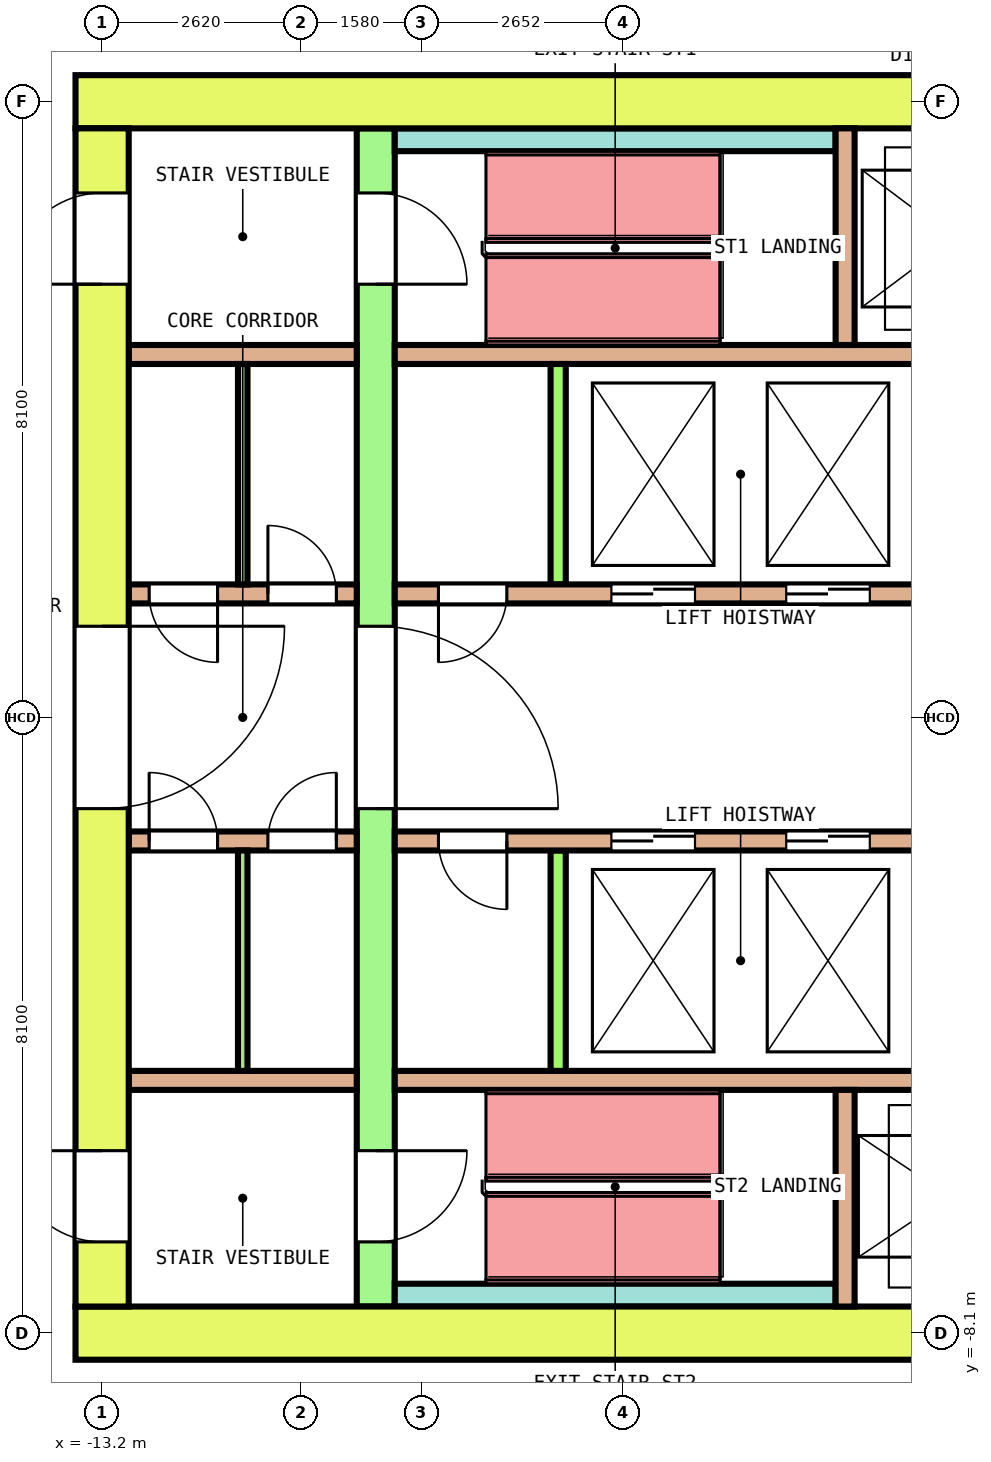
"""IFC4 building model, lengths in metres.
Left out: names, types, materials, properties, quantities, classifications, styles, units other than length and angle.
Written with IfcOpenShell. Run it as: python <this file> out.ifc"""

import sys

from ifc_helpers import new_model, si_unit, direction, frame, frame_2d, origin, place, context, subcontext, project, spatial, rectangle, extrude, element, fill, save


model = new_model("IFC4")
c1 = context("Model", 3, precision=1e-05, world=origin(), true_north=direction((0.0, 1.0)))
c2 = subcontext(c1, "Body", "Model", "MODEL_VIEW")
j1 = project(units=[si_unit("LENGTHUNIT", "METRE"), si_unit("PLANEANGLEUNIT", "RADIAN")], contexts=[c1])
p1 = place(None, origin())
s1 = spatial("IfcSite", under=j1, at=p1, CompositionType="ELEMENT")
p2 = place(p1, origin())
s2 = spatial("IfcBuilding", under=s1, at=p2, CompositionType="ELEMENT")
p3 = place(p2, frame((0.0, 0.0, 193.6)))
s3 = spatial("IfcBuildingStorey", under=s2, at=p3, CompositionType="ELEMENT", Elevation=193.6)
p4 = place(p3, frame((-13.55, 8.1, 0.0), z_axis=(0.0, 0.0, 1.0), x_axis=(1.0, 0.0, 0.0)))
e1 = element("IfcWall", 1, at=p4, inside=s3, PredefinedType="SHEAR", context=c2, shape_type="SweptSolid", body=[
    extrude(rectangle(XDim=27.1, YDim=0.7, at=frame_2d((13.55, 0.0))), origin(), (0.0, 0.0, 1.0), 4.1),
])
p5 = place(p4, frame((14.475, 0.0, 0.0)))
e2 = element("IfcOpeningElement", 2, at=p5, cuts=e1, PredefinedType="OPENING", context=c2, shape_type="SweptSolid", body=[
    extrude(rectangle(XDim=1.4, YDim=2.1, at=frame_2d((0.7, 1.05))), frame((0.0, 0.36, 0.0), z_axis=(0.0, -1.0, 0.0), x_axis=(1.0, 0.0, 0.0)), (0.0, 0.0, 1.0), 0.72),
])
p6 = place(p3, frame((-13.55, -8.1, 0.0), z_axis=(0.0, 0.0, 1.0), x_axis=(1.0, 0.0, 0.0)))
e3 = element("IfcWall", 3, at=p6, inside=s3, PredefinedType="SHEAR", context=c2, shape_type="SweptSolid", body=[
    extrude(rectangle(XDim=27.1, YDim=0.7, at=frame_2d((13.55, 0.0))), origin(), (0.0, 0.0, 1.0), 4.1),
])
p7 = place(p6, frame((15.1, 0.0, 0.0)))
e4 = element("IfcOpeningElement", 4, at=p7, cuts=e3, PredefinedType="OPENING", context=c2, shape_type="SweptSolid", body=[
    extrude(rectangle(XDim=1.2, YDim=2.1, at=frame_2d((0.6, 1.05))), frame((0.0, 0.36, 0.0), z_axis=(0.0, -1.0, 0.0), x_axis=(1.0, 0.0, 0.0)), (0.0, 0.0, 1.0), 0.72),
])
p8 = place(p3, frame((-13.2, -7.75, 0.0), z_axis=(0.0, 0.0, 1.0), x_axis=(0.0, 1.0, 0.0)))
e5 = element("IfcWall", 5, at=p8, inside=s3, PredefinedType="SHEAR", context=c2, shape_type="SweptSolid", body=[
    extrude(rectangle(XDim=15.5, YDim=0.7, at=frame_2d((7.75, 0.0))), origin(), (0.0, 0.0, 1.0), 4.1),
])
p9 = place(p8, frame((6.55, 0.0, 0.0)))
e6 = element("IfcOpeningElement", 6, at=p9, cuts=e5, PredefinedType="OPENING", context=c2, shape_type="SweptSolid", body=[
    extrude(rectangle(XDim=2.4, YDim=2.1, at=frame_2d((1.2, 1.05))), frame((0.0, 0.36, 0.0), z_axis=(0.0, -1.0, 0.0), x_axis=(1.0, 0.0, 0.0)), (0.0, 0.0, 1.0), 0.72),
])
p10 = place(p8, frame((13.45, 0.0, 0.0)))
e7 = element("IfcOpeningElement", 7, at=p10, cuts=e5, PredefinedType="OPENING", context=c2, shape_type="SweptSolid", body=[
    extrude(rectangle(XDim=1.2, YDim=2.1, at=frame_2d((0.6, 1.05))), frame((0.0, 0.36, 0.0), z_axis=(0.0, -1.0, 0.0), x_axis=(1.0, 0.0, 0.0)), (0.0, 0.0, 1.0), 0.72),
])
p11 = place(p8, frame((0.85, 0.0, 0.0)))
e8 = element("IfcOpeningElement", 8, at=p11, cuts=e5, PredefinedType="OPENING", context=c2, shape_type="SweptSolid", body=[
    extrude(rectangle(XDim=1.2, YDim=2.1, at=frame_2d((0.6, 1.05))), frame((0.0, 0.36, 0.0), z_axis=(0.0, -1.0, 0.0), x_axis=(1.0, 0.0, 0.0)), (0.0, 0.0, 1.0), 0.72),
])
p12 = place(p3, frame((-9.6, -7.75, 0.0), z_axis=(0.0, 0.0, 1.0), x_axis=(0.0, 1.0, 0.0)))
e9 = element("IfcWall", 9, at=p12, inside=s3, PredefinedType="SHEAR", context=c2, shape_type="SweptSolid", body=[
    extrude(rectangle(XDim=15.5, YDim=0.5, at=frame_2d((7.75, 0.0))), origin(), (0.0, 0.0, 1.0), 4.1),
])
p13 = place(p12, frame((6.55, 0.0, 0.0)))
e10 = element("IfcOpeningElement", 10, at=p13, cuts=e9, PredefinedType="OPENING", context=c2, shape_type="SweptSolid", body=[
    extrude(rectangle(XDim=2.4, YDim=2.1, at=frame_2d((1.2, 1.05))), frame((0.0, 0.26, 0.0), z_axis=(0.0, -1.0, 0.0), x_axis=(1.0, 0.0, 0.0)), (0.0, 0.0, 1.0), 0.52),
])
p14 = place(p12, frame((13.45, 0.0, 0.0)))
e11 = element("IfcOpeningElement", 11, at=p14, cuts=e9, PredefinedType="OPENING", context=c2, shape_type="SweptSolid", body=[
    extrude(rectangle(XDim=1.2, YDim=2.1, at=frame_2d((0.6, 1.05))), frame((0.0, 0.26, 0.0), z_axis=(0.0, -1.0, 0.0), x_axis=(1.0, 0.0, 0.0)), (0.0, 0.0, 1.0), 0.52),
])
p15 = place(p12, frame((0.85, 0.0, 0.0)))
e12 = element("IfcOpeningElement", 12, at=p15, cuts=e9, PredefinedType="OPENING", context=c2, shape_type="SweptSolid", body=[
    extrude(rectangle(XDim=1.2, YDim=2.1, at=frame_2d((0.6, 1.05))), frame((0.0, 0.26, 0.0), z_axis=(0.0, -1.0, 0.0), x_axis=(1.0, 0.0, 0.0)), (0.0, 0.0, 1.0), 0.52),
])
p16 = place(p3, frame((-12.85, 1.625, 0.0), z_axis=(0.0, 0.0, 1.0), x_axis=(1.0, 0.0, 0.0)))
e13 = element("IfcWall", 13, at=p16, inside=s3, PredefinedType="SOLIDWALL", context=c2, shape_type="SweptSolid", body=[
    extrude(rectangle(XDim=3.0, YDim=0.25, at=frame_2d((1.5, 0.0))), origin(), (0.0, 0.0, 1.0), 4.1),
])
p17 = place(p16, frame((0.269, 0.0, 0.0)))
e14 = element("IfcOpeningElement", 14, at=p17, cuts=e13, PredefinedType="OPENING", context=c2, shape_type="SweptSolid", body=[
    extrude(rectangle(XDim=0.9, YDim=2.1, at=frame_2d((0.45, 1.05))), frame((0.0, 0.135, 0.0), z_axis=(0.0, -1.0, 0.0), x_axis=(1.0, 0.0, 0.0)), (0.0, 0.0, 1.0), 0.27),
])
p18 = place(p16, frame((1.831, 0.0, 0.0)))
e15 = element("IfcOpeningElement", 15, at=p18, cuts=e13, PredefinedType="OPENING", context=c2, shape_type="SweptSolid", body=[
    extrude(rectangle(XDim=0.9, YDim=2.1, at=frame_2d((0.45, 1.05))), frame((0.0, 0.135, 0.0), z_axis=(0.0, -1.0, 0.0), x_axis=(1.0, 0.0, 0.0)), (0.0, 0.0, 1.0), 0.27),
])
p19 = place(p3, frame((-9.35, 1.625, 0.0), z_axis=(0.0, 0.0, 1.0), x_axis=(1.0, 0.0, 0.0)))
e16 = element("IfcWall", 16, at=p19, inside=s3, PredefinedType="SOLIDWALL", context=c2, shape_type="SweptSolid", body=[
    extrude(rectangle(XDim=18.7, YDim=0.25, at=frame_2d((9.35, 0.0))), origin(), (0.0, 0.0, 1.0), 4.1),
])
p20 = place(p19, frame((2.85, 0.0, 0.0)))
e17 = element("IfcOpeningElement", 17, at=p20, cuts=e16, PredefinedType="OPENING", context=c2, shape_type="SweptSolid", body=[
    extrude(rectangle(XDim=1.1, YDim=2.1, at=frame_2d((0.55, 1.05))), frame((0.0, 0.135, 0.0), z_axis=(0.0, -1.0, 0.0), x_axis=(1.0, 0.0, 0.0)), (0.0, 0.0, 1.0), 0.27),
])
p21 = place(p19, frame((5.15, 0.0, 0.0)))
e18 = element("IfcOpeningElement", 18, at=p21, cuts=e16, PredefinedType="OPENING", context=c2, shape_type="SweptSolid", body=[
    extrude(rectangle(XDim=1.1, YDim=2.1, at=frame_2d((0.55, 1.05))), frame((0.0, 0.135, 0.0), z_axis=(0.0, -1.0, 0.0), x_axis=(1.0, 0.0, 0.0)), (0.0, 0.0, 1.0), 0.27),
])
p22 = place(p19, frame((14.8, 0.0, 0.0)))
e19 = element("IfcOpeningElement", 19, at=p22, cuts=e16, PredefinedType="OPENING", context=c2, shape_type="SweptSolid", body=[
    extrude(rectangle(XDim=1.1, YDim=2.1, at=frame_2d((0.55, 1.05))), frame((0.0, 0.135, 0.0), z_axis=(0.0, -1.0, 0.0), x_axis=(1.0, 0.0, 0.0)), (0.0, 0.0, 1.0), 0.27),
])
p23 = place(p19, frame((0.575, 0.0, 0.0)))
e20 = element("IfcOpeningElement", 20, at=p23, cuts=e16, PredefinedType="OPENING", context=c2, shape_type="SweptSolid", body=[
    extrude(rectangle(XDim=0.9, YDim=2.1, at=frame_2d((0.45, 1.05))), frame((0.0, 0.135, 0.0), z_axis=(0.0, -1.0, 0.0), x_axis=(1.0, 0.0, 0.0)), (0.0, 0.0, 1.0), 0.27),
])
p24 = place(p19, frame((17.225, 0.0, 0.0)))
e21 = element("IfcOpeningElement", 21, at=p24, cuts=e16, PredefinedType="OPENING", context=c2, shape_type="SweptSolid", body=[
    extrude(rectangle(XDim=0.9, YDim=2.1, at=frame_2d((0.45, 1.05))), frame((0.0, 0.135, 0.0), z_axis=(0.0, -1.0, 0.0), x_axis=(1.0, 0.0, 0.0)), (0.0, 0.0, 1.0), 0.27),
])
p25 = place(p3, frame((-12.85, 4.775, 0.0), z_axis=(0.0, 0.0, 1.0), x_axis=(1.0, 0.0, 0.0)))
e22 = element("IfcWall", 22, at=p25, inside=s3, PredefinedType="SOLIDWALL", context=c2, shape_type="SweptSolid", body=[
    extrude(rectangle(XDim=3.0, YDim=0.25, at=frame_2d((1.5, 0.0))), origin(), (0.0, 0.0, 1.0), 4.1),
])
p26 = place(p3, frame((-9.35, 4.775, 0.0), z_axis=(0.0, 0.0, 1.0), x_axis=(1.0, 0.0, 0.0)))
e23 = element("IfcWall", 23, at=p26, inside=s3, PredefinedType="SOLIDWALL", context=c2, shape_type="SweptSolid", body=[
    extrude(rectangle(XDim=18.7, YDim=0.25, at=frame_2d((9.35, 0.0))), origin(), (0.0, 0.0, 1.0), 4.1),
])
p27 = place(p3, frame((-7.2, 1.75, 0.0), z_axis=(0.0, 0.0, 1.0), x_axis=(0.0, 1.0, 0.0)))
e24 = element("IfcWall", 24, at=p27, inside=s3, PredefinedType="SOLIDWALL", context=c2, shape_type="SweptSolid", body=[
    extrude(rectangle(XDim=2.9, YDim=0.2, at=frame_2d((1.45, 0.0))), origin(), (0.0, 0.0, 1.0), 4.1),
])
p28 = place(p3, frame((-12.85, -1.625, 0.0), z_axis=(0.0, 0.0, 1.0), x_axis=(1.0, 0.0, 0.0)))
e25 = element("IfcWall", 25, at=p28, inside=s3, PredefinedType="SOLIDWALL", context=c2, shape_type="SweptSolid", body=[
    extrude(rectangle(XDim=3.0, YDim=0.25, at=frame_2d((1.5, 0.0))), origin(), (0.0, 0.0, 1.0), 4.1),
])
p29 = place(p28, frame((0.269, 0.0, 0.0)))
e26 = element("IfcOpeningElement", 26, at=p29, cuts=e25, PredefinedType="OPENING", context=c2, shape_type="SweptSolid", body=[
    extrude(rectangle(XDim=0.9, YDim=2.1, at=frame_2d((0.45, 1.05))), frame((0.0, 0.135, 0.0), z_axis=(0.0, -1.0, 0.0), x_axis=(1.0, 0.0, 0.0)), (0.0, 0.0, 1.0), 0.27),
])
p30 = place(p28, frame((1.831, 0.0, 0.0)))
e27 = element("IfcOpeningElement", 27, at=p30, cuts=e25, PredefinedType="OPENING", context=c2, shape_type="SweptSolid", body=[
    extrude(rectangle(XDim=0.9, YDim=2.1, at=frame_2d((0.45, 1.05))), frame((0.0, 0.135, 0.0), z_axis=(0.0, -1.0, 0.0), x_axis=(1.0, 0.0, 0.0)), (0.0, 0.0, 1.0), 0.27),
])
p31 = place(p3, frame((-9.35, -1.625, 0.0), z_axis=(0.0, 0.0, 1.0), x_axis=(1.0, 0.0, 0.0)))
e28 = element("IfcWall", 28, at=p31, inside=s3, PredefinedType="SOLIDWALL", context=c2, shape_type="SweptSolid", body=[
    extrude(rectangle(XDim=18.7, YDim=0.25, at=frame_2d((9.35, 0.0))), origin(), (0.0, 0.0, 1.0), 4.1),
])
p32 = place(p31, frame((2.85, 0.0, 0.0)))
e29 = element("IfcOpeningElement", 29, at=p32, cuts=e28, PredefinedType="OPENING", context=c2, shape_type="SweptSolid", body=[
    extrude(rectangle(XDim=1.1, YDim=2.1, at=frame_2d((0.55, 1.05))), frame((0.0, 0.135, 0.0), z_axis=(0.0, -1.0, 0.0), x_axis=(1.0, 0.0, 0.0)), (0.0, 0.0, 1.0), 0.27),
])
p33 = place(p31, frame((5.15, 0.0, 0.0)))
e30 = element("IfcOpeningElement", 30, at=p33, cuts=e28, PredefinedType="OPENING", context=c2, shape_type="SweptSolid", body=[
    extrude(rectangle(XDim=1.1, YDim=2.1, at=frame_2d((0.55, 1.05))), frame((0.0, 0.135, 0.0), z_axis=(0.0, -1.0, 0.0), x_axis=(1.0, 0.0, 0.0)), (0.0, 0.0, 1.0), 0.27),
])
p34 = place(p31, frame((14.8, 0.0, 0.0)))
e31 = element("IfcOpeningElement", 31, at=p34, cuts=e28, PredefinedType="OPENING", context=c2, shape_type="SweptSolid", body=[
    extrude(rectangle(XDim=1.1, YDim=2.1, at=frame_2d((0.55, 1.05))), frame((0.0, 0.135, 0.0), z_axis=(0.0, -1.0, 0.0), x_axis=(1.0, 0.0, 0.0)), (0.0, 0.0, 1.0), 0.27),
])
p35 = place(p31, frame((0.575, 0.0, 0.0)))
e32 = element("IfcOpeningElement", 32, at=p35, cuts=e28, PredefinedType="OPENING", context=c2, shape_type="SweptSolid", body=[
    extrude(rectangle(XDim=0.9, YDim=2.1, at=frame_2d((0.45, 1.05))), frame((0.0, 0.135, 0.0), z_axis=(0.0, -1.0, 0.0), x_axis=(1.0, 0.0, 0.0)), (0.0, 0.0, 1.0), 0.27),
])
p36 = place(p31, frame((17.225, 0.0, 0.0)))
e33 = element("IfcOpeningElement", 33, at=p36, cuts=e28, PredefinedType="OPENING", context=c2, shape_type="SweptSolid", body=[
    extrude(rectangle(XDim=0.9, YDim=2.1, at=frame_2d((0.45, 1.05))), frame((0.0, 0.135, 0.0), z_axis=(0.0, -1.0, 0.0), x_axis=(1.0, 0.0, 0.0)), (0.0, 0.0, 1.0), 0.27),
])
p37 = place(p3, frame((-12.85, -4.775, 0.0), z_axis=(0.0, 0.0, 1.0), x_axis=(1.0, 0.0, 0.0)))
e34 = element("IfcWall", 34, at=p37, inside=s3, PredefinedType="SOLIDWALL", context=c2, shape_type="SweptSolid", body=[
    extrude(rectangle(XDim=3.0, YDim=0.25, at=frame_2d((1.5, 0.0))), origin(), (0.0, 0.0, 1.0), 4.1),
])
p38 = place(p3, frame((-9.35, -4.775, 0.0), z_axis=(0.0, 0.0, 1.0), x_axis=(1.0, 0.0, 0.0)))
e35 = element("IfcWall", 35, at=p38, inside=s3, PredefinedType="SOLIDWALL", context=c2, shape_type="SweptSolid", body=[
    extrude(rectangle(XDim=18.7, YDim=0.25, at=frame_2d((9.35, 0.0))), origin(), (0.0, 0.0, 1.0), 4.1),
])
p39 = place(p3, frame((-7.2, -4.65, 0.0), z_axis=(0.0, 0.0, 1.0), x_axis=(0.0, 1.0, 0.0)))
e36 = element("IfcWall", 36, at=p39, inside=s3, PredefinedType="SOLIDWALL", context=c2, shape_type="SweptSolid", body=[
    extrude(rectangle(XDim=2.9, YDim=0.2, at=frame_2d((1.45, 0.0))), origin(), (0.0, 0.0, 1.0), 4.1),
])
p40 = place(p3, frame((-9.35, 7.6, 0.0), z_axis=(0.0, 0.0, 1.0), x_axis=(1.0, 0.0, 0.0)))
e37 = element("IfcWall", 37, at=p40, inside=s3, PredefinedType="SOLIDWALL", context=c2, shape_type="SweptSolid", body=[
    extrude(rectangle(XDim=5.8, YDim=0.3, at=frame_2d((2.9, 0.0))), origin(), (0.0, 0.0, 1.0), 4.1),
])
p41 = place(p3, frame((-3.425, 4.9, 0.0), z_axis=(0.0, 0.0, 1.0), x_axis=(0.0, 1.0, 0.0)))
e38 = element("IfcWall", 38, at=p41, inside=s3, PredefinedType="SOLIDWALL", context=c2, shape_type="SweptSolid", body=[
    extrude(rectangle(XDim=2.85, YDim=0.25, at=frame_2d((1.425, 0.0))), origin(), (0.0, 0.0, 1.0), 4.1),
])
p42 = place(p3, frame((-9.35, -7.6, 0.0), z_axis=(0.0, 0.0, 1.0), x_axis=(1.0, 0.0, 0.0)))
e39 = element("IfcWall", 39, at=p42, inside=s3, PredefinedType="SOLIDWALL", context=c2, shape_type="SweptSolid", body=[
    extrude(rectangle(XDim=5.8, YDim=0.3, at=frame_2d((2.9, 0.0))), origin(), (0.0, 0.0, 1.0), 4.1),
])
p43 = place(p3, frame((-3.425, -7.75, 0.0), z_axis=(0.0, 0.0, 1.0), x_axis=(0.0, 1.0, 0.0)))
e40 = element("IfcWall", 40, at=p43, inside=s3, PredefinedType="SOLIDWALL", context=c2, shape_type="SweptSolid", body=[
    extrude(rectangle(XDim=2.85, YDim=0.25, at=frame_2d((1.425, 0.0))), origin(), (0.0, 0.0, 1.0), 4.1),
])
for number, where, z_axis, x_axis in (
    (41, (-11.35, 1.75, 0.0), (0.0, 0.0, 1.0), (0.0, 1.0, 0.0)),
    (42, (-11.35, -4.65, 0.0), (0.0, 0.0, 1.0), (0.0, 1.0, 0.0)),
):
    element("IfcWall", number, at=place(p3, frame(where, z_axis=z_axis, x_axis=x_axis)), inside=s3, PredefinedType="PARTITIONING", context=c2, shape_type="SweptSolid", body=[
        extrude(rectangle(XDim=2.9, YDim=0.125, at=frame_2d((1.45, 0.0))), origin(), (0.0, 0.0, 1.0), 4.1),
    ])
p44 = place(p20, origin())
e43 = element("IfcDoor", 43, at=p44, inside=s3, OperationType="DOUBLE_DOOR_SLIDING", PredefinedType="DOOR", context=c2, shape_type="SweptSolid", body=[
    extrude(rectangle(XDim=1.1, YDim=2.1, at=frame_2d((0.55, 1.05))), frame((0.0, 0.075, 0.0), z_axis=(0.0, -1.0, 0.0), x_axis=(1.0, 0.0, 0.0)), (0.0, 0.0, 1.0), 0.15),
])
fill(e17, e43)
p45 = place(p21, origin())
e44 = element("IfcDoor", 44, at=p45, inside=s3, OperationType="DOUBLE_DOOR_SLIDING", PredefinedType="DOOR", context=c2, shape_type="SweptSolid", body=[
    extrude(rectangle(XDim=1.1, YDim=2.1, at=frame_2d((0.55, 1.05))), frame((0.0, 0.075, 0.0), z_axis=(0.0, -1.0, 0.0), x_axis=(1.0, 0.0, 0.0)), (0.0, 0.0, 1.0), 0.15),
])
fill(e18, e44)
p46 = place(p32, origin())
e45 = element("IfcDoor", 45, at=p46, inside=s3, OperationType="DOUBLE_DOOR_SLIDING", PredefinedType="DOOR", context=c2, shape_type="SweptSolid", body=[
    extrude(rectangle(XDim=1.1, YDim=2.1, at=frame_2d((0.55, 1.05))), frame((0.0, 0.075, 0.0), z_axis=(0.0, -1.0, 0.0), x_axis=(1.0, 0.0, 0.0)), (0.0, 0.0, 1.0), 0.15),
])
fill(e29, e45)
p47 = place(p33, origin())
e46 = element("IfcDoor", 46, at=p47, inside=s3, OperationType="DOUBLE_DOOR_SLIDING", PredefinedType="DOOR", context=c2, shape_type="SweptSolid", body=[
    extrude(rectangle(XDim=1.1, YDim=2.1, at=frame_2d((0.55, 1.05))), frame((0.0, 0.075, 0.0), z_axis=(0.0, -1.0, 0.0), x_axis=(1.0, 0.0, 0.0)), (0.0, 0.0, 1.0), 0.15),
])
fill(e30, e46)
p48 = place(p13, origin())
e47 = element("IfcDoor", 47, at=p48, inside=s3, OperationType="DOUBLE_DOOR_SINGLE_SWING", PredefinedType="DOOR", context=c2, shape_type="SweptSolid", body=[
    extrude(rectangle(XDim=2.4, YDim=2.1, at=frame_2d((1.2, 1.05))), frame((0.0, 0.2, 0.0), z_axis=(0.0, -1.0, 0.0), x_axis=(1.0, 0.0, 0.0)), (0.0, 0.0, 1.0), 0.4),
])
fill(e10, e47)
p49 = place(p9, origin())
e48 = element("IfcDoor", 48, at=p49, inside=s3, OperationType="DOUBLE_DOOR_SINGLE_SWING", PredefinedType="DOOR", context=c2, shape_type="SweptSolid", body=[
    extrude(rectangle(XDim=2.4, YDim=2.1, at=frame_2d((1.2, 1.05))), frame((0.0, 0.3, 0.0), z_axis=(0.0, -1.0, 0.0), x_axis=(1.0, 0.0, 0.0)), (0.0, 0.0, 1.0), 0.6),
])
fill(e6, e48)
p50 = place(p14, origin())
e49 = element("IfcDoor", 49, at=p50, inside=s3, OperationType="SINGLE_SWING_LEFT", PredefinedType="DOOR", context=c2, shape_type="SweptSolid", body=[
    extrude(rectangle(XDim=1.2, YDim=2.1, at=frame_2d((0.6, 1.05))), frame((0.0, 0.2, 0.0), z_axis=(0.0, -1.0, 0.0), x_axis=(1.0, 0.0, 0.0)), (0.0, 0.0, 1.0), 0.4),
])
fill(e11, e49)
p51 = place(p10, origin())
e50 = element("IfcDoor", 50, at=p51, inside=s3, OperationType="SINGLE_SWING_RIGHT", PredefinedType="DOOR", context=c2, shape_type="SweptSolid", body=[
    extrude(rectangle(XDim=1.2, YDim=2.1, at=frame_2d((0.6, 1.05))), frame((0.0, 0.3, 0.0), z_axis=(0.0, -1.0, 0.0), x_axis=(1.0, 0.0, 0.0)), (0.0, 0.0, 1.0), 0.6),
])
fill(e7, e50)
p52 = place(p15, origin())
e51 = element("IfcDoor", 51, at=p52, inside=s3, OperationType="SINGLE_SWING_LEFT", PredefinedType="DOOR", context=c2, shape_type="SweptSolid", body=[
    extrude(rectangle(XDim=1.2, YDim=2.1, at=frame_2d((0.6, 1.05))), frame((0.0, 0.2, 0.0), z_axis=(0.0, -1.0, 0.0), x_axis=(1.0, 0.0, 0.0)), (0.0, 0.0, 1.0), 0.4),
])
fill(e12, e51)
p53 = place(p11, origin())
e52 = element("IfcDoor", 52, at=p53, inside=s3, OperationType="SINGLE_SWING_RIGHT", PredefinedType="DOOR", context=c2, shape_type="SweptSolid", body=[
    extrude(rectangle(XDim=1.2, YDim=2.1, at=frame_2d((0.6, 1.05))), frame((0.0, 0.3, 0.0), z_axis=(0.0, -1.0, 0.0), x_axis=(1.0, 0.0, 0.0)), (0.0, 0.0, 1.0), 0.6),
])
fill(e8, e52)
p54 = place(p17, origin())
e53 = element("IfcDoor", 53, at=p54, inside=s3, OperationType="SINGLE_SWING_RIGHT", PredefinedType="DOOR", context=c2, shape_type="SweptSolid", body=[
    extrude(rectangle(XDim=0.9, YDim=2.1, at=frame_2d((0.45, 1.05))), frame((0.0, 0.075, 0.0), z_axis=(0.0, -1.0, 0.0), x_axis=(1.0, 0.0, 0.0)), (0.0, 0.0, 1.0), 0.15),
])
fill(e14, e53)
p55 = place(p18, origin())
e54 = element("IfcDoor", 54, at=p55, inside=s3, OperationType="SINGLE_SWING_LEFT", PredefinedType="DOOR", context=c2, shape_type="SweptSolid", body=[
    extrude(rectangle(XDim=0.9, YDim=2.1, at=frame_2d((0.45, 1.05))), frame((0.0, 0.075, 0.0), z_axis=(0.0, -1.0, 0.0), x_axis=(1.0, 0.0, 0.0)), (0.0, 0.0, 1.0), 0.15),
])
fill(e15, e54)
p56 = place(p23, origin())
e55 = element("IfcDoor", 55, at=p56, inside=s3, OperationType="SINGLE_SWING_RIGHT", PredefinedType="DOOR", context=c2, shape_type="SweptSolid", body=[
    extrude(rectangle(XDim=0.9, YDim=2.1, at=frame_2d((0.45, 1.05))), frame((0.0, 0.075, 0.0), z_axis=(0.0, -1.0, 0.0), x_axis=(1.0, 0.0, 0.0)), (0.0, 0.0, 1.0), 0.15),
])
fill(e20, e55)
p57 = place(p29, origin())
e56 = element("IfcDoor", 56, at=p57, inside=s3, OperationType="SINGLE_SWING_LEFT", PredefinedType="DOOR", context=c2, shape_type="SweptSolid", body=[
    extrude(rectangle(XDim=0.9, YDim=2.1, at=frame_2d((0.45, 1.05))), frame((0.0, 0.075, 0.0), z_axis=(0.0, -1.0, 0.0), x_axis=(1.0, 0.0, 0.0)), (0.0, 0.0, 1.0), 0.15),
])
fill(e26, e56)
p58 = place(p30, origin())
e57 = element("IfcDoor", 57, at=p58, inside=s3, OperationType="SINGLE_SWING_RIGHT", PredefinedType="DOOR", context=c2, shape_type="SweptSolid", body=[
    extrude(rectangle(XDim=0.9, YDim=2.1, at=frame_2d((0.45, 1.05))), frame((0.0, 0.075, 0.0), z_axis=(0.0, -1.0, 0.0), x_axis=(1.0, 0.0, 0.0)), (0.0, 0.0, 1.0), 0.15),
])
fill(e27, e57)
p59 = place(p35, origin())
e58 = element("IfcDoor", 58, at=p59, inside=s3, OperationType="SINGLE_SWING_LEFT", PredefinedType="DOOR", context=c2, shape_type="SweptSolid", body=[
    extrude(rectangle(XDim=0.9, YDim=2.1, at=frame_2d((0.45, 1.05))), frame((0.0, 0.075, 0.0), z_axis=(0.0, -1.0, 0.0), x_axis=(1.0, 0.0, 0.0)), (0.0, 0.0, 1.0), 0.15),
])
fill(e32, e58)
save(model, sys.argv[1])
